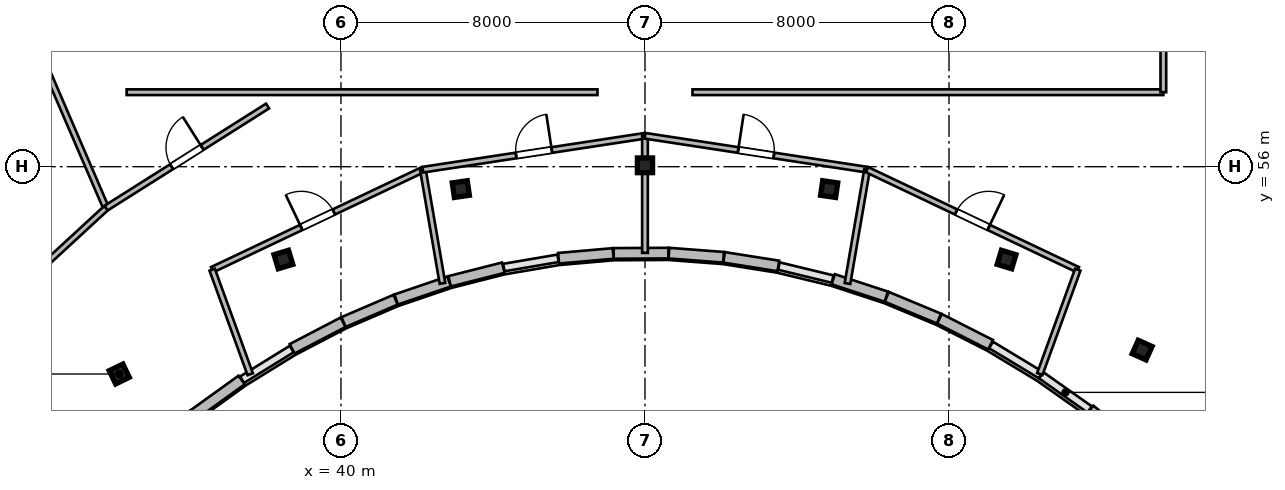
"""IFC4 building model, lengths in metres.
Left out: names, types, materials, properties, quantities, classifications, styles, units other than length and angle.
Written with IfcOpenShell. Run it as: python <this file> out.ifc"""

import sys

from ifc_helpers import new_model, si_unit, direction, frame, frame_2d, origin, origin_2d, place, context, subcontext, project, spatial, rectangle, i_section, extrude, source, transform, mapped, element, fill, save


model = new_model("IFC4")
c1 = context("Model", 3, precision=1e-05, world=origin(), true_north=direction((0.0, 1.0)))
c2 = subcontext(c1, "Body", "Model", "MODEL_VIEW")
j1 = project(units=[si_unit("LENGTHUNIT", "METRE"), si_unit("PLANEANGLEUNIT", "RADIAN")], contexts=[c1])
p1 = place(None, origin())
s1 = spatial("IfcSite", under=j1, at=p1, CompositionType="ELEMENT")
p2 = place(p1, origin())
s2 = spatial("IfcBuilding", under=s1, at=p2, CompositionType="ELEMENT")
p3 = place(p2, frame((0.0, 0.0, 275.7)))
s3 = spatial("IfcBuildingStorey", under=s2, at=p3, CompositionType="ELEMENT", Elevation=275.7)
m1 = source(origin(), c2, "Body", "SweptSolid", [
    extrude(i_section(OverallWidth=0.399, OverallDepth=0.387, WebThickness=0.021, FlangeThickness=0.033, at=origin_2d()), origin(), (0.0, 0.0, 1.0), 3.9),
])
for number, where, z_axis, x_axis in (
    (1, (34.166, 50.545, 0.0), (0.0, 0.0, 1.0), (-0.436, 0.9, 0.0)),
    (2, (38.485, 53.558, 0.0), (0.0, 0.0, 1.0), (-0.289, 0.957, 0.0)),
    (3, (43.154, 55.411, 0.0), (0.0, 0.0, 1.0), (-0.143, 0.99, 0.0)),
    (4, (48.0, 56.036, 0.0), (0.0, 0.0, 1.0), (0.0, 1.0, 0.0)),
    (5, (52.846, 55.411, 0.0), (0.0, 0.0, 1.0), (0.143, 0.99, 0.0)),
    (6, (57.515, 53.558, 0.0), (0.0, 0.0, 1.0), (0.289, 0.957, 0.0)),
    (7, (61.082, 51.175, 0.0), (0.0, 0.0, 1.0), (0.409, 0.912, 0.0)),
):
    element("IfcColumn", number, at=place(p3, frame(where, z_axis=z_axis, x_axis=x_axis)), inside=s3, PredefinedType="COLUMN", context=c2, shape_type="MappedRepresentation", body=[
        mapped(m1, transform((0.0, 0.0, 0.0), scale=1.0)),
    ])
m2 = source(origin(), c2, "Body", "SweptSolid", [
    extrude(rectangle(XDim=1.543, YDim=0.28, at=frame_2d((0.772, 0.0))), origin(), (0.0, 0.0, 1.0), 3.64),
])
p4 = place(p3, frame((60.908, 48.632, 0.0), z_axis=(0.0, 0.0, 1.0), x_axis=(-0.77582846857, 0.63094388606, 0.0)))
e8 = element("IfcWall", 8, at=p4, inside=s3, PredefinedType="SOLIDWALL", context=c2, shape_type="MappedRepresentation", body=[
    mapped(m2, transform((0.0, 0.0, 0.0), scale=1.0)),
])
m3 = source(origin(), c2, "Body", "SweptSolid", [
    extrude(rectangle(XDim=1.509, YDim=0.28, at=frame_2d((0.754, 0.0))), origin(), (0.0, 0.0, 1.0), 3.64),
])
p5 = place(p3, frame((57.094, 51.315, 0.0), z_axis=(0.0, 0.0, 1.0), x_axis=(-0.89169189228, 0.452642871635, 0.0)))
e9 = element("IfcWall", 9, at=p5, inside=s3, PredefinedType="SOLIDWALL", context=c2, shape_type="MappedRepresentation", body=[
    mapped(m3, transform((0.0, 0.0, 0.0), scale=1.0)),
])
m4 = source(origin(), c2, "Body", "SweptSolid", [
    extrude(rectangle(XDim=1.488, YDim=0.28, at=frame_2d((0.744, 0.0))), origin(), (0.0, 0.0, 1.0), 3.64),
])
p6 = place(p3, frame((55.736, 52.004, 0.0), z_axis=(0.0, 0.0, 1.0), x_axis=(-0.923261314935, 0.384172545017, 0.0)))
e10 = element("IfcWall", 10, at=p6, inside=s3, PredefinedType="SOLIDWALL", context=c2, shape_type="MappedRepresentation", body=[
    mapped(m4, transform((0.0, 0.0, 0.0), scale=1.0)),
])
m5 = source(origin(), c2, "Body", "SweptSolid", [
    extrude(rectangle(XDim=1.47, YDim=0.28, at=frame_2d((0.735, 0.0))), origin(), (0.0, 0.0, 1.0), 3.64),
])
p7 = place(p3, frame((54.35, 52.58, 0.0), z_axis=(0.0, 0.0, 1.0), x_axis=(-0.950248878954, 0.311491682145, 0.0)))
e11 = element("IfcWall", 11, at=p7, inside=s3, PredefinedType="SOLIDWALL", context=c2, shape_type="MappedRepresentation", body=[
    mapped(m5, transform((0.0, 0.0, 0.0), scale=1.0)),
])
m6 = source(origin(), c2, "Body", "SweptSolid", [
    extrude(rectangle(XDim=1.446, YDim=0.28, at=frame_2d((0.723, 0.0))), origin(), (0.0, 0.0, 1.0), 3.64),
])
p8 = place(p3, frame((51.509, 53.388, 0.0), z_axis=(0.0, 0.0, 1.0), x_axis=(-0.987650460941, 0.156673440642, 0.0)))
e12 = element("IfcWall", 12, at=p8, inside=s3, PredefinedType="SOLIDWALL", context=c2, shape_type="MappedRepresentation", body=[
    mapped(m6, transform((0.0, 0.0, 0.0), scale=1.0)),
])
m7 = source(origin(), c2, "Body", "SweptSolid", [
    extrude(rectangle(XDim=1.44, YDim=0.28, at=frame_2d((0.72, 0.0))), origin(), (0.0, 0.0, 1.0), 3.64),
])
p9 = place(p3, frame((50.066, 53.616, 0.0), z_axis=(0.0, 0.0, 1.0), x_axis=(-0.997124860794, 0.075776064736, 0.0)))
e13 = element("IfcWall", 13, at=p9, inside=s3, PredefinedType="SOLIDWALL", context=c2, shape_type="MappedRepresentation", body=[
    mapped(m7, transform((0.0, 0.0, 0.0), scale=1.0)),
])
m8 = source(origin(), c2, "Body", "SweptSolid", [
    extrude(rectangle(XDim=1.438, YDim=0.28, at=frame_2d((0.719, 0.0))), origin(), (0.0, 0.0, 1.0), 3.64),
])
p10 = place(p3, frame((48.615, 53.726, 0.0), z_axis=(0.0, 0.0, 1.0), x_axis=(-0.999982357135, -0.005940153174, 0.0)))
e14 = element("IfcWall", 14, at=p10, inside=s3, PredefinedType="SOLIDWALL", context=c2, shape_type="MappedRepresentation", body=[
    mapped(m8, transform((0.0, 0.0, 0.0), scale=1.0)),
])
m9 = source(origin(), c2, "Body", "SweptSolid", [
    extrude(rectangle(XDim=1.441, YDim=0.28, at=frame_2d((0.72, 0.0))), origin(), (0.0, 0.0, 1.0), 3.64),
])
p11 = place(p3, frame((47.162, 53.717, 0.0), z_axis=(0.0, 0.0, 1.0), x_axis=(-0.99617032352, -0.087433898101, 0.0)))
e15 = element("IfcWall", 15, at=p11, inside=s3, PredefinedType="SOLIDWALL", context=c2, shape_type="MappedRepresentation", body=[
    mapped(m9, transform((0.0, 0.0, 0.0), scale=1.0)),
])
m10 = source(origin(), c2, "Body", "SweptSolid", [
    extrude(rectangle(XDim=1.458, YDim=0.28, at=frame_2d((0.729, 0.0))), origin(), (0.0, 0.0, 1.0), 3.64),
])
p12 = place(p3, frame((44.271, 53.343, 0.0), z_axis=(0.0, 0.0, 1.0), x_axis=(-0.969109544438, -0.246630677083, 0.0)))
e16 = element("IfcWall", 16, at=p12, inside=s3, PredefinedType="SOLIDWALL", context=c2, shape_type="MappedRepresentation", body=[
    mapped(m10, transform((0.0, 0.0, 0.0), scale=1.0)),
])
m11 = source(origin(), c2, "Body", "SweptSolid", [
    extrude(rectangle(XDim=1.473, YDim=0.28, at=frame_2d((0.736, 0.0))), origin(), (0.0, 0.0, 1.0), 3.64),
])
p13 = place(p3, frame((42.845, 52.979, 0.0), z_axis=(0.0, 0.0, 1.0), x_axis=(-0.946641296917, -0.322289086026, 0.0)))
e17 = element("IfcWall", 17, at=p13, inside=s3, PredefinedType="SOLIDWALL", context=c2, shape_type="MappedRepresentation", body=[
    mapped(m11, transform((0.0, 0.0, 0.0), scale=1.0)),
])
m12 = source(origin(), c2, "Body", "SweptSolid", [
    extrude(rectangle(XDim=1.49, YDim=0.28, at=frame_2d((0.745, 0.0))), origin(), (0.0, 0.0, 1.0), 3.64),
])
p14 = place(p3, frame((41.438, 52.5, 0.0), z_axis=(0.0, 0.0, 1.0), x_axis=(-0.919009427656, -0.394235553799, 0.0)))
e18 = element("IfcWall", 18, at=p14, inside=s3, PredefinedType="SOLIDWALL", context=c2, shape_type="MappedRepresentation", body=[
    mapped(m12, transform((0.0, 0.0, 0.0), scale=1.0)),
])
m13 = source(origin(), c2, "Body", "SweptSolid", [
    extrude(rectangle(XDim=1.512, YDim=0.28, at=frame_2d((0.756, 0.0))), origin(), (0.0, 0.0, 1.0), 3.64),
])
p15 = place(p3, frame((40.056, 51.906, 0.0), z_axis=(0.0, 0.0, 1.0), x_axis=(-0.886841011195, -0.462074691865, 0.0)))
e19 = element("IfcWall", 19, at=p15, inside=s3, PredefinedType="SOLIDWALL", context=c2, shape_type="MappedRepresentation", body=[
    mapped(m13, transform((0.0, 0.0, 0.0), scale=1.0)),
])
m14 = source(origin(), c2, "Body", "SweptSolid", [
    extrude(rectangle(XDim=1.561, YDim=0.28, at=frame_2d((0.781, 0.0))), origin(), (0.0, 0.0, 1.0), 3.64),
])
p16 = place(p3, frame((37.387, 50.387, 0.0), z_axis=(0.0, 0.0, 1.0), x_axis=(-0.81154027425, -0.584296485758, 0.0)))
e20 = element("IfcWall", 20, at=p16, inside=s3, PredefinedType="SOLIDWALL", context=c2, shape_type="MappedRepresentation", body=[
    mapped(m14, transform((0.0, 0.0, 0.0), scale=1.0)),
])
m15 = source(origin(), c2, "Body", "SweptSolid", [
    extrude(rectangle(XDim=1.589, YDim=0.28, at=frame_2d((0.794, 0.0))), origin(), (0.0, 0.0, 1.0), 3.64),
])
p17 = place(p3, frame((36.11, 49.468, 0.0), z_axis=(0.0, 0.0, 1.0), x_axis=(-0.769805836273, -0.63827813251, 0.0)))
e21 = element("IfcWall", 21, at=p17, inside=s3, PredefinedType="SOLIDWALL", context=c2, shape_type="MappedRepresentation", body=[
    mapped(m15, transform((0.0, 0.0, 0.0), scale=1.0)),
])
m16 = source(origin(), c2, "Body", "SweptSolid", [
    extrude(rectangle(XDim=6.137, YDim=0.15, at=frame_2d((3.069, 0.0))), origin(), (0.0, 0.0, 1.0), 3.64),
])
p18 = place(p3, frame((36.611, 53.29, 0.0), z_axis=(0.0, 0.0, 1.0), x_axis=(0.903442784804, 0.428708682657, 0.0)))
e22 = element("IfcWall", 22, at=p18, inside=s3, PredefinedType="PARTITIONING", context=c2, shape_type="MappedRepresentation", body=[
    mapped(m16, transform((0.0, 0.0, 0.0), scale=1.0)),
])
p19 = place(p18, frame((2.594, 0.0, 0.0)))
e23 = element("IfcOpeningElement", 23, at=p19, cuts=e22, PredefinedType="OPENING", context=c2, shape_type="SweptSolid", body=[
    extrude(rectangle(XDim=0.95, YDim=2.1, at=frame_2d((0.475, 1.05))), frame((0.0, 0.085, 0.0), z_axis=(0.0, -1.0, 0.0), x_axis=(1.0, 0.0, 0.0)), (0.0, 0.0, 1.0), 0.17),
])
m17 = source(origin(), c2, "Body", "SweptSolid", [
    extrude(rectangle(XDim=2.927, YDim=0.15, at=frame_2d((1.464, 0.0))), origin(), (0.0, 0.0, 1.0), 3.64),
])
p20 = place(p3, frame((37.612, 50.539, 0.0), z_axis=(0.0, 0.0, 1.0), x_axis=(-0.342030996507, 0.93968867048, 0.0)))
e24 = element("IfcWall", 24, at=p20, inside=s3, PredefinedType="PARTITIONING", context=c2, shape_type="MappedRepresentation", body=[
    mapped(m17, transform((0.0, 0.0, 0.0), scale=1.0)),
])
m18 = source(origin(), c2, "Body", "SweptSolid", [
    extrude(rectangle(XDim=3.034, YDim=0.15, at=frame_2d((1.517, 0.0))), origin(), (0.0, 0.0, 1.0), 3.64),
])
p21 = place(p3, frame((42.671, 52.931, 0.0), z_axis=(0.0, 0.0, 1.0), x_axis=(-0.169785657008, 0.985481014873, 0.0)))
e25 = element("IfcWall", 25, at=p21, inside=s3, PredefinedType="PARTITIONING", context=c2, shape_type="MappedRepresentation", body=[
    mapped(m18, transform((0.0, 0.0, 0.0), scale=1.0)),
])
m19 = source(origin(), c2, "Body", "SweptSolid", [
    extrude(rectangle(XDim=5.912, YDim=0.15, at=frame_2d((2.956, 0.0))), origin(), (0.0, 0.0, 1.0), 3.64),
])
p22 = place(p3, frame((42.156, 55.921, 0.0), z_axis=(0.0, 0.0, 1.0), x_axis=(0.98854340791, 0.150936843342, 0.0)))
e26 = element("IfcWall", 26, at=p22, inside=s3, PredefinedType="PARTITIONING", context=c2, shape_type="MappedRepresentation", body=[
    mapped(m19, transform((0.0, 0.0, 0.0), scale=1.0)),
])
p23 = place(p22, frame((2.481, 0.0, 0.0)))
e27 = element("IfcOpeningElement", 27, at=p23, cuts=e26, PredefinedType="OPENING", context=c2, shape_type="SweptSolid", body=[
    extrude(rectangle(XDim=0.95, YDim=2.1, at=frame_2d((0.475, 1.05))), frame((0.0, 0.085, 0.0), z_axis=(0.0, -1.0, 0.0), x_axis=(1.0, 0.0, 0.0)), (0.0, 0.0, 1.0), 0.17),
])
m20 = source(origin(), c2, "Body", "SweptSolid", [
    extrude(rectangle(XDim=3.081, YDim=0.15, at=frame_2d((1.54, 0.0))), origin(), (0.0, 0.0, 1.0), 3.314),
])
p24 = place(p3, frame((48.0, 53.733, 0.0), z_axis=(0.0, 0.0, 1.0), x_axis=(0.0, 1.0, 0.0)))
e28 = element("IfcWall", 28, at=p24, inside=s3, PredefinedType="PARTITIONING", context=c2, shape_type="MappedRepresentation", body=[
    mapped(m20, transform((0.0, 0.0, 0.0), scale=1.0)),
])
p25 = place(p3, frame((48.0, 56.813, 0.0), z_axis=(0.0, 0.0, 1.0), x_axis=(0.98854340791, -0.150936843342, 0.0)))
e29 = element("IfcWall", 29, at=p25, inside=s3, PredefinedType="PARTITIONING", context=c2, shape_type="MappedRepresentation", body=[
    mapped(m19, transform((0.0, 0.0, 0.0), scale=1.0)),
])
p26 = place(p25, frame((2.481, 0.0, 0.0)))
e30 = element("IfcOpeningElement", 30, at=p26, cuts=e29, PredefinedType="OPENING", context=c2, shape_type="SweptSolid", body=[
    extrude(rectangle(XDim=0.95, YDim=2.1, at=frame_2d((0.475, 1.05))), frame((0.0, 0.085, 0.0), z_axis=(0.0, -1.0, 0.0), x_axis=(1.0, 0.0, 0.0)), (0.0, 0.0, 1.0), 0.17),
])
m21 = source(origin(), c2, "Body", "SweptSolid", [
    extrude(rectangle(XDim=3.039, YDim=0.15, at=frame_2d((1.52, 0.0))), origin(), (0.0, 0.0, 1.0), 3.64),
])
p27 = place(p3, frame((53.328, 52.926, 0.0), z_axis=(0.0, 0.0, 1.0), x_axis=(0.169815455764, 0.985475880468, 0.0)))
e31 = element("IfcWall", 31, at=p27, inside=s3, PredefinedType="PARTITIONING", context=c2, shape_type="MappedRepresentation", body=[
    mapped(m21, transform((0.0, 0.0, 0.0), scale=1.0)),
])
p28 = place(p3, frame((53.844, 55.921, 0.0), z_axis=(0.0, 0.0, 1.0), x_axis=(0.903442784804, -0.428708682657, 0.0)))
e32 = element("IfcWall", 32, at=p28, inside=s3, PredefinedType="PARTITIONING", context=c2, shape_type="MappedRepresentation", body=[
    mapped(m16, transform((0.0, 0.0, 0.0), scale=1.0)),
])
p29 = place(p28, frame((2.594, 0.0, 0.0)))
e33 = element("IfcOpeningElement", 33, at=p29, cuts=e32, PredefinedType="OPENING", context=c2, shape_type="SweptSolid", body=[
    extrude(rectangle(XDim=0.95, YDim=2.1, at=frame_2d((0.475, 1.05))), frame((0.0, 0.085, 0.0), z_axis=(0.0, -1.0, 0.0), x_axis=(1.0, 0.0, 0.0)), (0.0, 0.0, 1.0), 0.17),
])
m22 = source(origin(), c2, "Body", "SweptSolid", [
    extrude(rectangle(XDim=2.921, YDim=0.15, at=frame_2d((1.46, 0.0))), origin(), (0.0, 0.0, 1.0), 3.64),
])
p30 = place(p3, frame((58.39, 50.545, 0.0), z_axis=(0.0, 0.0, 1.0), x_axis=(0.34203834657, 0.939685995147, 0.0)))
e34 = element("IfcWall", 34, at=p30, inside=s3, PredefinedType="PARTITIONING", context=c2, shape_type="MappedRepresentation", body=[
    mapped(m22, transform((0.0, 0.0, 0.0), scale=1.0)),
])
m23 = source(origin(), c2, "Body", "SweptSolid", [
    extrude(rectangle(XDim=4.986, YDim=0.15, at=frame_2d((2.493, 0.0))), origin(), (0.0, 0.0, 1.0), 3.64),
])
p31 = place(p3, frame((30.153, 51.533, 0.0), z_axis=(0.0, 0.0, 1.0), x_axis=(0.735595190169, 0.677421372707, 0.0)))
e35 = element("IfcWall", 35, at=p31, inside=s3, PredefinedType="PARTITIONING", context=c2, shape_type="MappedRepresentation", body=[
    mapped(m23, transform((0.0, 0.0, 0.0), scale=1.0)),
])
p32 = place(p31, frame((2.018, 0.0, 0.0)))
e36 = element("IfcOpeningElement", 36, at=p32, cuts=e35, PredefinedType="OPENING", context=c2, shape_type="SweptSolid", body=[
    extrude(rectangle(XDim=0.95, YDim=2.1, at=frame_2d((0.475, 1.05))), frame((0.0, 0.085, 0.0), z_axis=(0.0, -1.0, 0.0), x_axis=(1.0, 0.0, 0.0)), (0.0, 0.0, 1.0), 0.17),
])
m24 = source(origin(), c2, "Body", "SweptSolid", [
    extrude(rectangle(XDim=17.556, YDim=0.15, at=frame_2d((8.778, 0.0))), origin(), (0.0, 0.0, 1.0), 3.64),
])
p33 = place(p3, frame((33.8, 54.958, 0.0), z_axis=(0.0, 0.0, 1.0), x_axis=(-0.395687598313, 0.918385172213, 0.0)))
e37 = element("IfcWall", 37, at=p33, inside=s3, PredefinedType="PARTITIONING", context=c2, shape_type="MappedRepresentation", body=[
    mapped(m24, transform((0.0, 0.0, 0.0), scale=1.0)),
])
m25 = source(origin(), c2, "Body", "SweptSolid", [
    extrude(rectangle(XDim=5.025, YDim=0.15, at=frame_2d((2.513, 0.0))), origin(), (0.0, 0.0, 1.0), 3.64),
])
p34 = place(p3, frame((33.82, 54.911, 0.0), z_axis=(0.0, 0.0, 1.0), x_axis=(0.84532378062, 0.534254345717, 0.0)))
e38 = element("IfcWall", 38, at=p34, inside=s3, PredefinedType="PARTITIONING", context=c2, shape_type="MappedRepresentation", body=[
    mapped(m25, transform((0.0, 0.0, 0.0), scale=1.0)),
])
p35 = place(p34, frame((2.038, 0.0, 0.0)))
e39 = element("IfcOpeningElement", 39, at=p35, cuts=e38, PredefinedType="OPENING", context=c2, shape_type="SweptSolid", body=[
    extrude(rectangle(XDim=0.95, YDim=2.1, at=frame_2d((0.475, 1.05))), frame((0.0, 0.085, 0.0), z_axis=(0.0, -1.0, 0.0), x_axis=(1.0, 0.0, 0.0)), (0.0, 0.0, 1.0), 0.17),
])
m26 = source(origin(), c2, "Body", "SweptSolid", [
    extrude(rectangle(XDim=12.39, YDim=0.15, at=frame_2d((6.195, 0.0))), origin(), (0.0, 0.0, 1.0), 3.27),
])
for number, where, z_axis, x_axis in (
    (40, (34.36, 57.96, 0.0), (0.0, 0.0, 1.0), (1.0, 0.0, 0.0)),
    (41, (49.25, 57.96, 0.0), (0.0, 0.0, 1.0), (1.0, 0.0, 0.0)),
):
    element("IfcWall", number, at=place(p3, frame(where, z_axis=z_axis, x_axis=x_axis)), inside=s3, PredefinedType="PARTITIONING", context=c2, shape_type="MappedRepresentation", body=[
        mapped(m26, transform((0.0, 0.0, 0.0), scale=1.0)),
    ])
m27 = source(origin(), c2, "Body", "SweptSolid", [
    extrude(rectangle(XDim=5.04, YDim=0.15, at=frame_2d((2.52, 0.0))), origin(), (0.0, 0.0, 1.0), 3.64),
])
p36 = place(p3, frame((61.64, 57.96, 0.0), z_axis=(0.0, 0.0, 1.0), x_axis=(0.0, 1.0, 0.0)))
e42 = element("IfcWall", 42, at=p36, inside=s3, PredefinedType="PARTITIONING", context=c2, shape_type="MappedRepresentation", body=[
    mapped(m27, transform((0.0, 0.0, 0.0), scale=1.0)),
])
p37 = place(p36, frame((1.44, 0.0, 0.0)))
e43 = element("IfcOpeningElement", 43, at=p37, cuts=e42, PredefinedType="OPENING", context=c2, shape_type="SweptSolid", body=[
    extrude(rectangle(XDim=0.95, YDim=2.1, at=frame_2d((0.475, 1.05))), frame((0.0, 0.085, 0.0), z_axis=(0.0, -1.0, 0.0), x_axis=(1.0, 0.0, 0.0)), (0.0, 0.0, 1.0), 0.17),
])
m28 = source(origin(), c2, "Body", "SweptSolid", [
    extrude(rectangle(XDim=0.95, YDim=2.1, at=frame_2d((0.475, 1.05))), frame((0.0, 0.025, 0.0), z_axis=(0.0, -1.0, 0.0), x_axis=(1.0, 0.0, 0.0)), (0.0, 0.0, 1.0), 0.05),
])
p38 = place(p19, origin())
e44 = element("IfcDoor", 44, at=p38, inside=s3, OperationType="SINGLE_SWING_LEFT", PredefinedType="DOOR", context=c2, shape_type="MappedRepresentation", body=[
    mapped(m28, transform((0.0, 0.0, 0.0), scale=1.0)),
])
fill(e23, e44)
p39 = place(p23, origin())
e45 = element("IfcDoor", 45, at=p39, inside=s3, OperationType="SINGLE_SWING_RIGHT", PredefinedType="DOOR", context=c2, shape_type="MappedRepresentation", body=[
    mapped(m28, transform((0.0, 0.0, 0.0), scale=1.0)),
])
fill(e27, e45)
p40 = place(p26, origin())
e46 = element("IfcDoor", 46, at=p40, inside=s3, OperationType="SINGLE_SWING_LEFT", PredefinedType="DOOR", context=c2, shape_type="MappedRepresentation", body=[
    mapped(m28, transform((0.0, 0.0, 0.0), scale=1.0)),
])
fill(e30, e46)
p41 = place(p29, origin())
e47 = element("IfcDoor", 47, at=p41, inside=s3, OperationType="SINGLE_SWING_RIGHT", PredefinedType="DOOR", context=c2, shape_type="MappedRepresentation", body=[
    mapped(m28, transform((0.0, 0.0, 0.0), scale=1.0)),
])
fill(e33, e47)
p42 = place(p35, origin())
e48 = element("IfcDoor", 48, at=p42, inside=s3, OperationType="SINGLE_SWING_RIGHT", PredefinedType="DOOR", context=c2, shape_type="MappedRepresentation", body=[
    mapped(m28, transform((0.0, 0.0, 0.0), scale=1.0)),
])
fill(e39, e48)
save(model, sys.argv[1])
